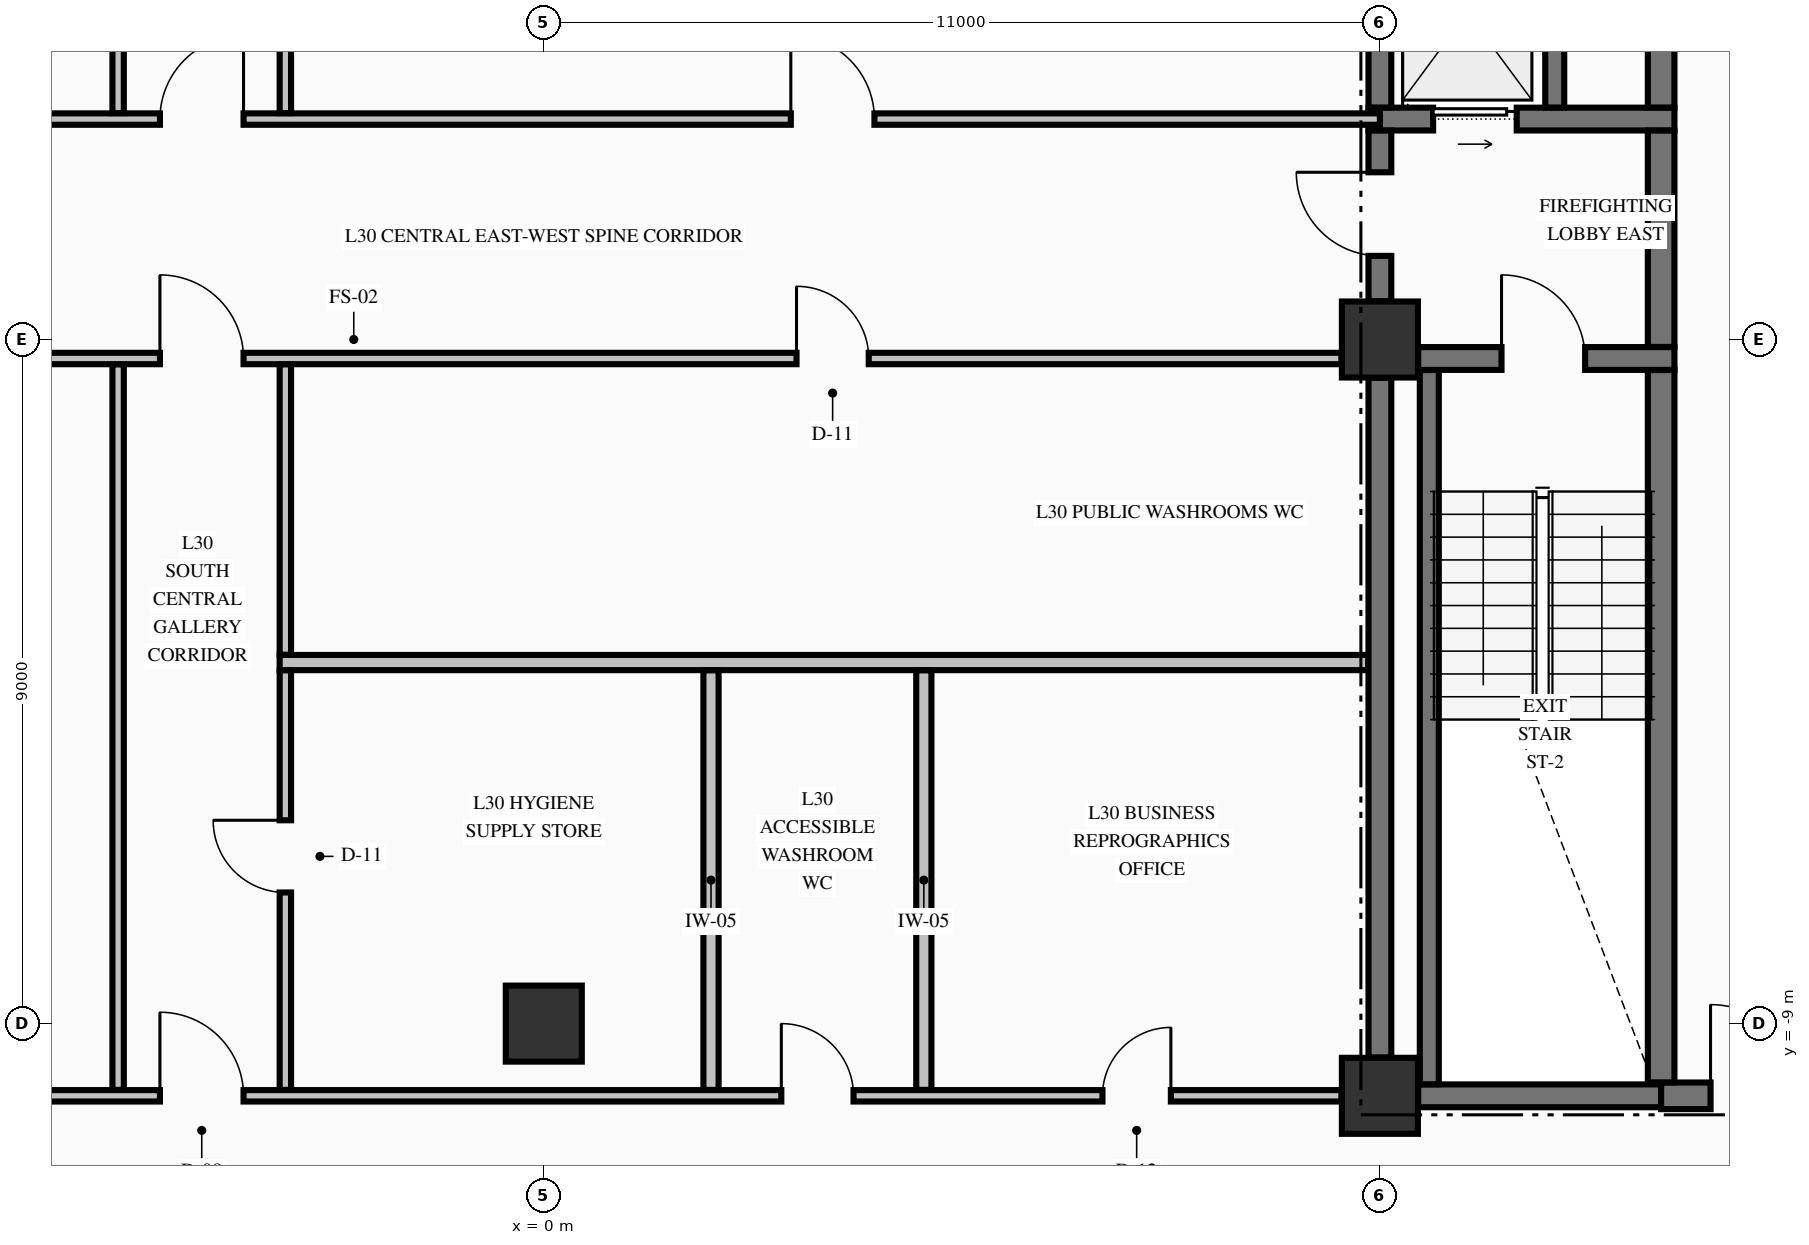
"""IFC4 building model, lengths in metres.
Left out: names, types, materials, properties, quantities, classifications, styles, units other than length and angle.
Written with IfcOpenShell. Run it as: python <this file> out.ifc"""

import sys

from ifc_helpers import new_model, si_unit, direction, frame, frame_2d, origin, origin_2d, place, context, subcontext, project, spatial, rectangle, extrude, element, fill, save


model = new_model("IFC4")
c1 = context("Model", 3, precision=1e-05, world=origin(), true_north=direction((0.0, 1.0)))
c2 = subcontext(c1, "Body", "Model", "MODEL_VIEW")
j1 = project(units=[si_unit("LENGTHUNIT", "METRE"), si_unit("PLANEANGLEUNIT", "RADIAN")], contexts=[c1])
p1 = place(None, origin())
s1 = spatial("IfcSite", under=j1, at=p1, CompositionType="ELEMENT")
p2 = place(p1, origin())
s2 = spatial("IfcBuilding", under=s1, at=p2, CompositionType="ELEMENT")
p3 = place(p2, frame((0.0, 0.0, 121.35)))
s3 = spatial("IfcBuildingStorey", under=s2, at=p3, CompositionType="ELEMENT", Elevation=121.35)
for number, where, z_axis, x_axis in (
    (1, (11.0, -9.95, -0.425), (0.0, 0.0, 1.0), (1.0, 0.0, 0.0)),
    (2, (11.0, 0.0, -0.425), (0.0, 0.0, 1.0), (1.0, 0.0, 0.0)),
    (3, (0.0, -9.0, -0.425), (0.0, 0.0, 1.0), (1.0, 0.0, 0.0)),
):
    element("IfcColumn", number, at=place(p3, frame(where, z_axis=z_axis, x_axis=x_axis)), inside=s3, PredefinedType="COLUMN", context=c2, shape_type="SweptSolid", body=[
        extrude(rectangle(XDim=1.0, YDim=1.0, at=origin_2d()), origin(), (0.0, 0.0, 1.0), 3.745),
    ])
p4 = place(p3, frame((11.504, -9.95, 0.0), z_axis=(0.0, 0.0, 1.0), x_axis=(1.0, 0.0, 0.0)))
e4 = element("IfcWall", 4, at=p4, inside=s3, PredefinedType="SHEAR", context=c2, shape_type="SweptSolid", body=[
    extrude(rectangle(XDim=3.196, YDim=0.3, at=frame_2d((1.598, 0.0))), origin(), (0.0, 0.0, 1.0), 3.32),
])
p5 = place(p3, frame((14.7, -9.95, 0.0), z_axis=(0.0, 0.0, 1.0), x_axis=(1.0, 0.0, 0.0)))
e5 = element("IfcWall", 5, at=p5, inside=s3, PredefinedType="SHEAR", context=c2, shape_type="SweptSolid", body=[
    extrude(rectangle(XDim=4.796, YDim=0.35, at=frame_2d((2.398, 0.0))), origin(), (0.0, 0.0, 1.0), 3.32),
])
p6 = place(p5, frame((0.65, 0.0, 0.0)))
e6 = element("IfcOpeningElement", 6, at=p6, cuts=e5, PredefinedType="OPENING", context=c2, shape_type="SweptSolid", body=[
    extrude(rectangle(XDim=1.2, YDim=2.15, at=frame_2d((0.6, 1.075))), frame((0.0, 0.185, 0.0), z_axis=(0.0, -1.0, 0.0), x_axis=(1.0, 0.0, 0.0)), (0.0, 0.0, 1.0), 0.37),
])
p7 = place(p3, frame((11.504, -0.25, 0.0), z_axis=(0.0, 0.0, 1.0), x_axis=(1.0, 0.0, 0.0)))
e7 = element("IfcWall", 7, at=p7, inside=s3, PredefinedType="SHEAR", context=c2, shape_type="SweptSolid", body=[
    extrude(rectangle(XDim=3.371, YDim=0.3, at=frame_2d((1.686, 0.0))), origin(), (0.0, 0.0, 1.0), 3.32),
])
p8 = place(p7, frame((1.096, 0.0, 0.0)))
e8 = element("IfcOpeningElement", 8, at=p8, cuts=e7, PredefinedType="OPENING", context=c2, shape_type="SweptSolid", body=[
    extrude(rectangle(XDim=1.1, YDim=2.15, at=frame_2d((0.55, 1.075))), frame((0.0, 0.16, 0.0), z_axis=(0.0, -1.0, 0.0), x_axis=(1.0, 0.0, 0.0)), (0.0, 0.0, 1.0), 0.32),
])
p9 = place(p3, frame((10.85, 2.9, 0.0), z_axis=(0.0, 0.0, 1.0), x_axis=(1.0, 0.0, 0.0)))
e9 = element("IfcWall", 9, at=p9, inside=s3, PredefinedType="SHEAR", context=c2, shape_type="SweptSolid", body=[
    extrude(rectangle(XDim=4.025, YDim=0.3, at=frame_2d((2.012, 0.0))), origin(), (0.0, 0.0, 1.0), 3.32),
])
p10 = place(p9, frame((0.85, 0.0, 0.0)))
e10 = element("IfcOpeningElement", 10, at=p10, cuts=e9, PredefinedType="OPENING", context=c2, shape_type="SweptSolid", body=[
    extrude(rectangle(XDim=1.1, YDim=2.2, at=frame_2d((0.55, 1.1))), frame((0.0, 0.16, 0.0), z_axis=(0.0, -1.0, 0.0), x_axis=(1.0, 0.0, 0.0)), (0.0, 0.0, 1.0), 0.32),
])
p11 = place(p3, frame((-10.494, -9.95, 0.0), z_axis=(0.0, 0.0, 1.0), x_axis=(1.0, 0.0, 0.0)))
e11 = element("IfcWall", 11, at=p11, inside=s3, PredefinedType="PARTITIONING", context=c2, shape_type="SweptSolid", body=[
    extrude(rectangle(XDim=20.988, YDim=0.15, at=frame_2d((10.494, 0.0))), origin(), (0.0, 0.0, 1.0), 3.32),
])
p12 = place(p11, frame((5.444, 0.0, 0.0)))
e12 = element("IfcOpeningElement", 12, at=p12, cuts=e11, PredefinedType="OPENING", context=c2, shape_type="SweptSolid", body=[
    extrude(rectangle(XDim=1.1, YDim=2.15, at=frame_2d((0.55, 1.075))), frame((0.0, 0.085, 0.0), z_axis=(0.0, -1.0, 0.0), x_axis=(1.0, 0.0, 0.0)), (0.0, 0.0, 1.0), 0.17),
])
p13 = place(p11, frame((13.619, 0.0, 0.0)))
e13 = element("IfcOpeningElement", 13, at=p13, cuts=e11, PredefinedType="OPENING", context=c2, shape_type="SweptSolid", body=[
    extrude(rectangle(XDim=0.95, YDim=2.15, at=frame_2d((0.475, 1.075))), frame((0.0, 0.085, 0.0), z_axis=(0.0, -1.0, 0.0), x_axis=(1.0, 0.0, 0.0)), (0.0, 0.0, 1.0), 0.17),
])
p14 = place(p11, frame((17.844, 0.0, 0.0)))
e14 = element("IfcOpeningElement", 14, at=p14, cuts=e11, PredefinedType="OPENING", context=c2, shape_type="SweptSolid", body=[
    extrude(rectangle(XDim=0.9, YDim=2.15, at=frame_2d((0.45, 1.075))), frame((0.0, 0.085, 0.0), z_axis=(0.0, -1.0, 0.0), x_axis=(1.0, 0.0, 0.0)), (0.0, 0.0, 1.0), 0.17),
])
p15 = place(p3, frame((-3.475, -4.25, 0.0), z_axis=(0.0, 0.0, 1.0), x_axis=(1.0, 0.0, 0.0)))
e15 = element("IfcWall", 15, at=p15, inside=s3, PredefinedType="PARTITIONING", context=c2, shape_type="SweptSolid", body=[
    extrude(rectangle(XDim=14.322, YDim=0.2, at=frame_2d((7.161, 0.0))), origin(), (0.0, 0.0, 1.0), 3.32),
])
p16 = place(p3, frame((-10.494, -0.25, 0.0), z_axis=(0.0, 0.0, 1.0), x_axis=(1.0, 0.0, 0.0)))
e16 = element("IfcWall", 16, at=p16, inside=s3, PredefinedType="PARTITIONING", context=c2, shape_type="SweptSolid", body=[
    extrude(rectangle(XDim=20.988, YDim=0.15, at=frame_2d((10.494, 0.0))), origin(), (0.0, 0.0, 1.0), 3.32),
])
p17 = place(p16, frame((5.444, 0.0, 0.0)))
e17 = element("IfcOpeningElement", 17, at=p17, cuts=e16, PredefinedType="OPENING", context=c2, shape_type="SweptSolid", body=[
    extrude(rectangle(XDim=1.1, YDim=2.15, at=frame_2d((0.55, 1.075))), frame((0.0, 0.085, 0.0), z_axis=(0.0, -1.0, 0.0), x_axis=(1.0, 0.0, 0.0)), (0.0, 0.0, 1.0), 0.17),
])
p18 = place(p16, frame((1.669, 0.0, 0.0)))
e18 = element("IfcOpeningElement", 18, at=p18, cuts=e16, PredefinedType="OPENING", context=c2, shape_type="SweptSolid", body=[
    extrude(rectangle(XDim=1.05, YDim=2.15, at=frame_2d((0.525, 1.075))), frame((0.0, 0.085, 0.0), z_axis=(0.0, -1.0, 0.0), x_axis=(1.0, 0.0, 0.0)), (0.0, 0.0, 1.0), 0.17),
])
p19 = place(p16, frame((13.819, 0.0, 0.0)))
e19 = element("IfcOpeningElement", 19, at=p19, cuts=e16, PredefinedType="OPENING", context=c2, shape_type="SweptSolid", body=[
    extrude(rectangle(XDim=0.95, YDim=2.15, at=frame_2d((0.475, 1.075))), frame((0.0, 0.085, 0.0), z_axis=(0.0, -1.0, 0.0), x_axis=(1.0, 0.0, 0.0)), (0.0, 0.0, 1.0), 0.17),
])
p20 = place(p3, frame((-11.0, 2.9, 0.0), z_axis=(0.0, 0.0, 1.0), x_axis=(1.0, 0.0, 0.0)))
e20 = element("IfcWall", 20, at=p20, inside=s3, PredefinedType="PARTITIONING", context=c2, shape_type="SweptSolid", body=[
    extrude(rectangle(XDim=22.0, YDim=0.15, at=frame_2d((11.0, 0.0))), origin(), (0.0, 0.0, 1.0), 3.32),
])
p21 = place(p20, frame((5.95, 0.0, 0.0)))
e21 = element("IfcOpeningElement", 21, at=p21, cuts=e20, PredefinedType="OPENING", context=c2, shape_type="SweptSolid", body=[
    extrude(rectangle(XDim=1.1, YDim=2.15, at=frame_2d((0.55, 1.075))), frame((0.0, 0.085, 0.0), z_axis=(0.0, -1.0, 0.0), x_axis=(1.0, 0.0, 0.0)), (0.0, 0.0, 1.0), 0.17),
])
p22 = place(p20, frame((2.175, 0.0, 0.0)))
e22 = element("IfcOpeningElement", 22, at=p22, cuts=e20, PredefinedType="OPENING", context=c2, shape_type="SweptSolid", body=[
    extrude(rectangle(XDim=1.05, YDim=2.15, at=frame_2d((0.525, 1.075))), frame((0.0, 0.085, 0.0), z_axis=(0.0, -1.0, 0.0), x_axis=(1.0, 0.0, 0.0)), (0.0, 0.0, 1.0), 0.17),
])
p23 = place(p20, frame((14.25, 0.0, 0.0)))
e23 = element("IfcOpeningElement", 23, at=p23, cuts=e20, PredefinedType="OPENING", context=c2, shape_type="SweptSolid", body=[
    extrude(rectangle(XDim=1.1, YDim=2.15, at=frame_2d((0.55, 1.075))), frame((0.0, 0.085, 0.0), z_axis=(0.0, -1.0, 0.0), x_axis=(1.0, 0.0, 0.0)), (0.0, 0.0, 1.0), 0.17),
])
p24 = place(p3, frame((11.0, -9.446, 0.0), z_axis=(0.0, 0.0, 1.0), x_axis=(0.0, 1.0, 0.0)))
e24 = element("IfcWall", 24, at=p24, inside=s3, PredefinedType="SHEAR", context=c2, shape_type="SweptSolid", body=[
    extrude(rectangle(XDim=8.942, YDim=0.3, at=frame_2d((4.471, 0.0))), origin(), (0.0, 0.0, 1.0), 3.32),
])
p25 = place(p3, frame((11.0, 0.504, 0.0), z_axis=(0.0, 0.0, 1.0), x_axis=(0.0, 1.0, 0.0)))
e25 = element("IfcWall", 25, at=p25, inside=s3, PredefinedType="SHEAR", context=c2, shape_type="SweptSolid", body=[
    extrude(rectangle(XDim=2.244, YDim=0.3, at=frame_2d((1.122, 0.0))), origin(), (0.0, 0.0, 1.0), 3.32),
])
p26 = place(p25, frame((0.596, 0.0, 0.0)))
e26 = element("IfcOpeningElement", 26, at=p26, cuts=e25, PredefinedType="OPENING", context=c2, shape_type="SweptSolid", body=[
    extrude(rectangle(XDim=1.1, YDim=2.15, at=frame_2d((0.55, 1.075))), frame((0.0, 0.16, 0.0), z_axis=(0.0, -1.0, 0.0), x_axis=(1.0, 0.0, 0.0)), (0.0, 0.0, 1.0), 0.32),
])
p27 = place(p3, frame((11.0, 3.052, 0.0), z_axis=(0.0, 0.0, 1.0), x_axis=(0.0, 1.0, 0.0)))
e27 = element("IfcWall", 27, at=p27, inside=s3, PredefinedType="SHEAR", context=c2, shape_type="SweptSolid", body=[
    extrude(rectangle(XDim=2.496, YDim=0.3, at=frame_2d((1.248, 0.0))), origin(), (0.0, 0.0, 1.0), 3.32),
])
p28 = place(p3, frame((11.65, -9.798, 0.0), z_axis=(0.0, 0.0, 1.0), x_axis=(0.0, 1.0, 0.0)))
e28 = element("IfcWall", 28, at=p28, inside=s3, PredefinedType="SOLIDWALL", context=c2, shape_type="SweptSolid", body=[
    extrude(rectangle(XDim=9.396, YDim=0.25, at=frame_2d((4.698, 0.0))), origin(), (0.0, 0.0, 1.0), 3.32),
])
p29 = place(p3, frame((13.3, 3.052, 0.0), z_axis=(0.0, 0.0, 1.0), x_axis=(0.0, 1.0, 0.0)))
e29 = element("IfcWall", 29, at=p29, inside=s3, PredefinedType="SOLIDWALL", context=c2, shape_type="SweptSolid", body=[
    extrude(rectangle(XDim=2.496, YDim=0.25, at=frame_2d((1.248, 0.0))), origin(), (0.0, 0.0, 1.0), 3.32),
])
p30 = place(p3, frame((14.7, -9.773, 0.0), z_axis=(0.0, 0.0, 1.0), x_axis=(0.0, 1.0, 0.0)))
e30 = element("IfcWall", 30, at=p30, inside=s3, PredefinedType="SHEAR", context=c2, shape_type="SweptSolid", body=[
    extrude(rectangle(XDim=9.371, YDim=0.35, at=frame_2d((4.686, 0.0))), origin(), (0.0, 0.0, 1.0), 3.32),
])
p31 = place(p3, frame((14.7, -0.098, 0.0), z_axis=(0.0, 0.0, 1.0), x_axis=(0.0, 1.0, 0.0)))
e31 = element("IfcWall", 31, at=p31, inside=s3, PredefinedType="SHEAR", context=c2, shape_type="SweptSolid", body=[
    extrude(rectangle(XDim=2.846, YDim=0.35, at=frame_2d((1.423, 0.0))), origin(), (0.0, 0.0, 1.0), 3.32),
])
p32 = place(p3, frame((14.7, 3.052, 0.0), z_axis=(0.0, 0.0, 1.0), x_axis=(0.0, 1.0, 0.0)))
e32 = element("IfcWall", 32, at=p32, inside=s3, PredefinedType="SHEAR", context=c2, shape_type="SweptSolid", body=[
    extrude(rectangle(XDim=2.496, YDim=0.35, at=frame_2d((1.248, 0.0))), origin(), (0.0, 0.0, 1.0), 3.32),
])
p33 = place(p3, frame((-5.6, -9.872, 0.0), z_axis=(0.0, 0.0, 1.0), x_axis=(0.0, 1.0, 0.0)))
e33 = element("IfcWall", 33, at=p33, inside=s3, PredefinedType="PARTITIONING", context=c2, shape_type="SweptSolid", body=[
    extrude(rectangle(XDim=9.544, YDim=0.15, at=frame_2d((4.772, 0.0))), origin(), (0.0, 0.0, 1.0), 3.32),
])
p34 = place(p3, frame((-5.6, 2.978, 0.0), z_axis=(0.0, 0.0, 1.0), x_axis=(0.0, 1.0, 0.0)))
e34 = element("IfcWall", 34, at=p34, inside=s3, PredefinedType="PARTITIONING", context=c2, shape_type="SweptSolid", body=[
    extrude(rectangle(XDim=7.444, YDim=0.15, at=frame_2d((3.722, 0.0))), origin(), (0.0, 0.0, 1.0), 3.32),
])
p35 = place(p3, frame((-3.4, -9.872, 0.0), z_axis=(0.0, 0.0, 1.0), x_axis=(0.0, 1.0, 0.0)))
e35 = element("IfcWall", 35, at=p35, inside=s3, PredefinedType="PARTITIONING", context=c2, shape_type="SweptSolid", body=[
    extrude(rectangle(XDim=5.519, YDim=0.15, at=frame_2d((2.76, 0.0))), origin(), (0.0, 0.0, 1.0), 3.32),
])
p36 = place(p35, frame((2.597, 0.0, 0.0)))
e36 = element("IfcOpeningElement", 36, at=p36, cuts=e35, PredefinedType="OPENING", context=c2, shape_type="SweptSolid", body=[
    extrude(rectangle(XDim=0.95, YDim=2.15, at=frame_2d((0.475, 1.075))), frame((0.0, 0.085, 0.0), z_axis=(0.0, -1.0, 0.0), x_axis=(1.0, 0.0, 0.0)), (0.0, 0.0, 1.0), 0.17),
])
p37 = place(p3, frame((-3.4, -4.147, 0.0), z_axis=(0.0, 0.0, 1.0), x_axis=(0.0, 1.0, 0.0)))
e37 = element("IfcWall", 37, at=p37, inside=s3, PredefinedType="PARTITIONING", context=c2, shape_type="SweptSolid", body=[
    extrude(rectangle(XDim=3.819, YDim=0.15, at=frame_2d((1.91, 0.0))), origin(), (0.0, 0.0, 1.0), 3.32),
])
p38 = place(p3, frame((-3.4, 2.978, 0.0), z_axis=(0.0, 0.0, 1.0), x_axis=(0.0, 1.0, 0.0)))
e38 = element("IfcWall", 38, at=p38, inside=s3, PredefinedType="PARTITIONING", context=c2, shape_type="SweptSolid", body=[
    extrude(rectangle(XDim=7.444, YDim=0.15, at=frame_2d((3.722, 0.0))), origin(), (0.0, 0.0, 1.0), 3.32),
])
for number, where, z_axis, x_axis in (
    (39, (2.2, -9.872, 0.0), (0.0, 0.0, 1.0), (0.0, 1.0, 0.0)),
    (40, (5.0, -9.872, 0.0), (0.0, 0.0, 1.0), (0.0, 1.0, 0.0)),
):
    element("IfcWall", number, at=place(p3, frame(where, z_axis=z_axis, x_axis=x_axis)), inside=s3, PredefinedType="PARTITIONING", context=c2, shape_type="SweptSolid", body=[
        extrude(rectangle(XDim=5.519, YDim=0.2, at=frame_2d((2.76, 0.0))), origin(), (0.0, 0.0, 1.0), 3.32),
    ])
p39 = place(p8, origin())
e41 = element("IfcDoor", 41, at=p39, inside=s3, OperationType="SINGLE_SWING_LEFT", PredefinedType="DOOR", context=c2, shape_type="SweptSolid", body=[
    extrude(rectangle(XDim=1.1, YDim=2.15, at=frame_2d((0.55, 1.075))), frame((0.0, 0.025, 0.0), z_axis=(0.0, -1.0, 0.0), x_axis=(1.0, 0.0, 0.0)), (0.0, 0.0, 1.0), 0.05),
])
fill(e8, e41)
p40 = place(p26, origin())
e42 = element("IfcDoor", 42, at=p40, inside=s3, OperationType="SINGLE_SWING_RIGHT", PredefinedType="DOOR", context=c2, shape_type="SweptSolid", body=[
    extrude(rectangle(XDim=1.1, YDim=2.15, at=frame_2d((0.55, 1.075))), frame((0.0, 0.025, 0.0), z_axis=(0.0, -1.0, 0.0), x_axis=(1.0, 0.0, 0.0)), (0.0, 0.0, 1.0), 0.05),
])
fill(e26, e42)
p41 = place(p10, origin())
e43 = element("IfcDoor", 43, at=p41, inside=s3, OperationType="SLIDING_TO_RIGHT", PredefinedType="DOOR", context=c2, shape_type="SweptSolid", body=[
    extrude(rectangle(XDim=1.1, YDim=2.2, at=frame_2d((0.55, 1.1))), frame((0.0, 0.025, 0.0), z_axis=(0.0, -1.0, 0.0), x_axis=(1.0, 0.0, 0.0)), (0.0, 0.0, 1.0), 0.05),
])
fill(e10, e43)
p42 = place(p6, origin())
e44 = element("IfcDoor", 44, at=p42, inside=s3, OperationType="SINGLE_SWING_LEFT", PredefinedType="DOOR", context=c2, shape_type="SweptSolid", body=[
    extrude(rectangle(XDim=1.2, YDim=2.15, at=frame_2d((0.6, 1.075))), frame((0.0, 0.025, 0.0), z_axis=(0.0, -1.0, 0.0), x_axis=(1.0, 0.0, 0.0)), (0.0, 0.0, 1.0), 0.05),
])
fill(e6, e44)
p43 = place(p12, origin())
e45 = element("IfcDoor", 45, at=p43, inside=s3, OperationType="SINGLE_SWING_LEFT", PredefinedType="DOOR", context=c2, shape_type="SweptSolid", body=[
    extrude(rectangle(XDim=1.1, YDim=2.15, at=frame_2d((0.55, 1.075))), frame((0.0, 0.025, 0.0), z_axis=(0.0, -1.0, 0.0), x_axis=(1.0, 0.0, 0.0)), (0.0, 0.0, 1.0), 0.05),
])
fill(e12, e45)
p44 = place(p21, origin())
e46 = element("IfcDoor", 46, at=p44, inside=s3, OperationType="SINGLE_SWING_RIGHT", PredefinedType="DOOR", context=c2, shape_type="SweptSolid", body=[
    extrude(rectangle(XDim=1.1, YDim=2.15, at=frame_2d((0.55, 1.075))), frame((0.0, 0.025, 0.0), z_axis=(0.0, -1.0, 0.0), x_axis=(1.0, 0.0, 0.0)), (0.0, 0.0, 1.0), 0.05),
])
fill(e21, e46)
p45 = place(p17, origin())
e47 = element("IfcDoor", 47, at=p45, inside=s3, OperationType="SINGLE_SWING_LEFT", PredefinedType="DOOR", context=c2, shape_type="SweptSolid", body=[
    extrude(rectangle(XDim=1.1, YDim=2.15, at=frame_2d((0.55, 1.075))), frame((0.0, 0.025, 0.0), z_axis=(0.0, -1.0, 0.0), x_axis=(1.0, 0.0, 0.0)), (0.0, 0.0, 1.0), 0.05),
])
fill(e17, e47)
p46 = place(p23, origin())
e48 = element("IfcDoor", 48, at=p46, inside=s3, OperationType="SINGLE_SWING_LEFT", PredefinedType="DOOR", context=c2, shape_type="SweptSolid", body=[
    extrude(rectangle(XDim=1.1, YDim=2.15, at=frame_2d((0.55, 1.075))), frame((0.0, 0.025, 0.0), z_axis=(0.0, -1.0, 0.0), x_axis=(1.0, 0.0, 0.0)), (0.0, 0.0, 1.0), 0.05),
])
fill(e23, e48)
p47 = place(p19, origin())
e49 = element("IfcDoor", 49, at=p47, inside=s3, OperationType="SINGLE_SWING_LEFT", PredefinedType="DOOR", context=c2, shape_type="SweptSolid", body=[
    extrude(rectangle(XDim=0.95, YDim=2.15, at=frame_2d((0.475, 1.075))), frame((0.0, 0.025, 0.0), z_axis=(0.0, -1.0, 0.0), x_axis=(1.0, 0.0, 0.0)), (0.0, 0.0, 1.0), 0.05),
])
fill(e19, e49)
p48 = place(p36, origin())
e50 = element("IfcDoor", 50, at=p48, inside=s3, OperationType="SINGLE_SWING_RIGHT", PredefinedType="DOOR", context=c2, shape_type="SweptSolid", body=[
    extrude(rectangle(XDim=0.95, YDim=2.15, at=frame_2d((0.475, 1.075))), frame((0.0, 0.025, 0.0), z_axis=(0.0, -1.0, 0.0), x_axis=(1.0, 0.0, 0.0)), (0.0, 0.0, 1.0), 0.05),
])
fill(e36, e50)
p49 = place(p13, origin())
e51 = element("IfcDoor", 51, at=p49, inside=s3, OperationType="SINGLE_SWING_LEFT", PredefinedType="DOOR", context=c2, shape_type="SweptSolid", body=[
    extrude(rectangle(XDim=0.95, YDim=2.15, at=frame_2d((0.475, 1.075))), frame((0.0, 0.025, 0.0), z_axis=(0.0, -1.0, 0.0), x_axis=(1.0, 0.0, 0.0)), (0.0, 0.0, 1.0), 0.05),
])
fill(e13, e51)
p50 = place(p14, origin())
e52 = element("IfcDoor", 52, at=p50, inside=s3, OperationType="SINGLE_SWING_RIGHT", PredefinedType="DOOR", context=c2, shape_type="SweptSolid", body=[
    extrude(rectangle(XDim=0.9, YDim=2.15, at=frame_2d((0.45, 1.075))), frame((0.0, 0.025, 0.0), z_axis=(0.0, -1.0, 0.0), x_axis=(1.0, 0.0, 0.0)), (0.0, 0.0, 1.0), 0.05),
])
fill(e14, e52)
save(model, sys.argv[1])
